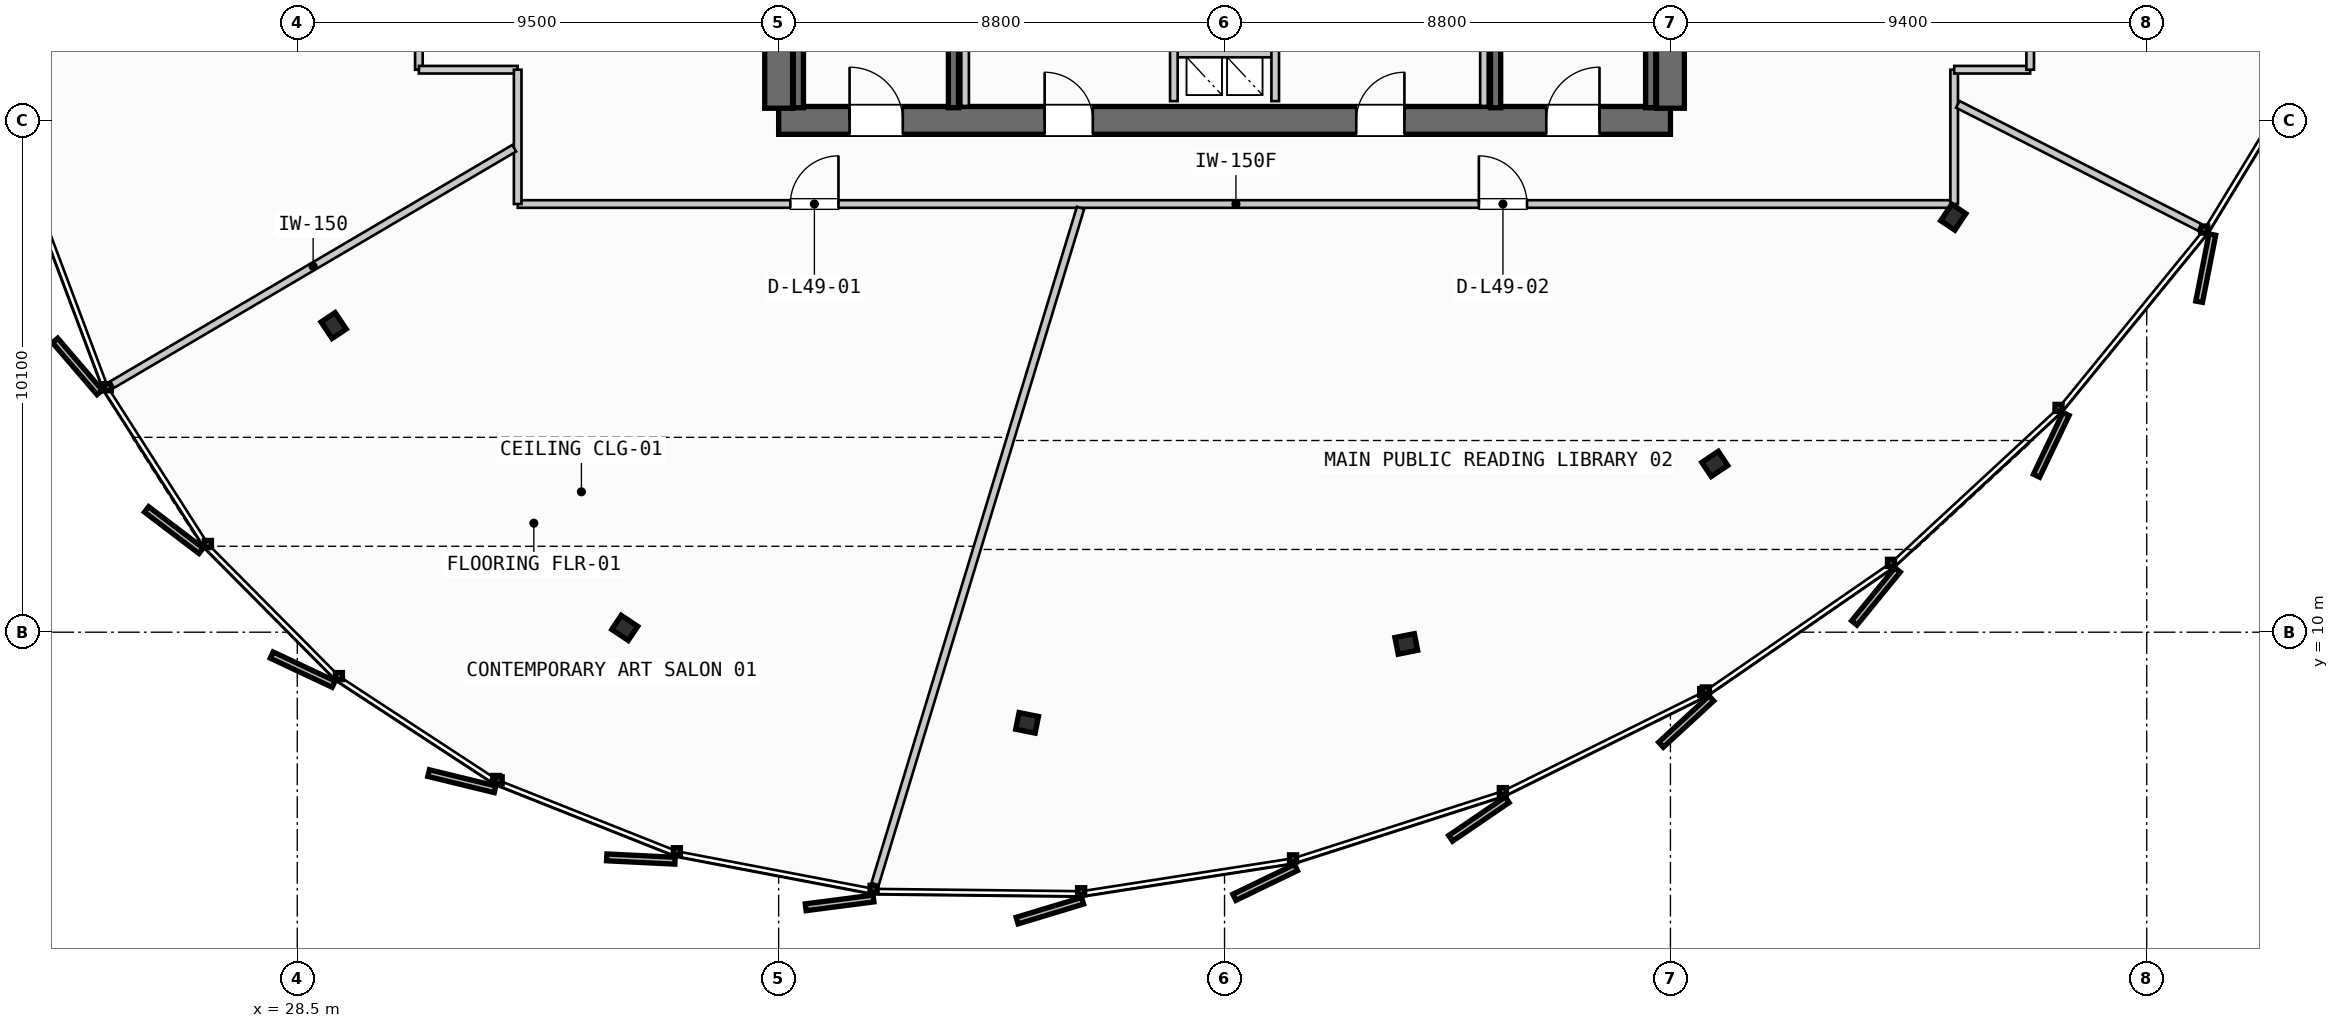
"""IFC4 building model, lengths in metres.
Left out: names, types, materials, properties, quantities, classifications, styles, units other than length and angle.
Written with IfcOpenShell. Run it as: python <this file> out.ifc"""

import sys

from ifc_helpers import new_model, si_unit, direction, frame, frame_2d, origin, origin_2d, place, context, subcontext, project, spatial, rectangle, i_section, extrude, source, transform, mapped, element, fill, save


model = new_model("IFC4")
c1 = context("Model", 3, precision=1e-05, world=origin(), true_north=direction((0.0, 1.0)))
c2 = subcontext(c1, "Body", "Model", "MODEL_VIEW")
j1 = project(units=[si_unit("LENGTHUNIT", "METRE"), si_unit("PLANEANGLEUNIT", "RADIAN")], contexts=[c1])
p1 = place(None, origin())
s1 = spatial("IfcSite", under=j1, at=p1, CompositionType="ELEMENT")
p2 = place(p1, origin())
s2 = spatial("IfcBuilding", under=s1, at=p2, CompositionType="ELEMENT")
p3 = place(p2, frame((0.0, 0.0, 190.4)))
s3 = spatial("IfcBuildingStorey", under=s2, at=p3, CompositionType="ELEMENT", Elevation=190.4)
p4 = place(p3, frame((38.0, 20.1, 0.0), z_axis=(0.0, 0.0, 1.0), x_axis=(1.0, 0.0, 0.0)))
e1 = element("IfcWall", 1, at=p4, inside=s3, PredefinedType="SHEAR", context=c2, shape_type="SweptSolid", body=[
    extrude(rectangle(XDim=17.6, YDim=0.55, at=frame_2d((8.8, 0.0))), origin(), (0.0, 0.0, 1.0), 3.26),
])
p5 = place(p4, frame((1.4, 0.0, 0.0)))
e2 = element("IfcOpeningElement", 2, at=p5, cuts=e1, PredefinedType="OPENING", context=c2, shape_type="SweptSolid", body=[
    extrude(rectangle(XDim=1.05, YDim=2.15, at=frame_2d((0.525, 1.075))), frame((0.0, 0.285, 0.0), z_axis=(0.0, -1.0, 0.0), x_axis=(1.0, 0.0, 0.0)), (0.0, 0.0, 1.0), 0.57),
])
p6 = place(p4, frame((15.15, 0.0, 0.0)))
e3 = element("IfcOpeningElement", 3, at=p6, cuts=e1, PredefinedType="OPENING", context=c2, shape_type="SweptSolid", body=[
    extrude(rectangle(XDim=1.05, YDim=2.15, at=frame_2d((0.525, 1.075))), frame((0.0, 0.285, 0.0), z_axis=(0.0, -1.0, 0.0), x_axis=(1.0, 0.0, 0.0)), (0.0, 0.0, 1.0), 0.57),
])
p7 = place(p4, frame((5.25, 0.0, 0.0)))
e4 = element("IfcOpeningElement", 4, at=p7, cuts=e1, PredefinedType="OPENING", context=c2, shape_type="SweptSolid", body=[
    extrude(rectangle(XDim=0.95, YDim=2.15, at=frame_2d((0.475, 1.075))), frame((0.0, 0.285, 0.0), z_axis=(0.0, -1.0, 0.0), x_axis=(1.0, 0.0, 0.0)), (0.0, 0.0, 1.0), 0.57),
])
p8 = place(p4, frame((11.4, 0.0, 0.0)))
e5 = element("IfcOpeningElement", 5, at=p8, cuts=e1, PredefinedType="OPENING", context=c2, shape_type="SweptSolid", body=[
    extrude(rectangle(XDim=0.95, YDim=2.15, at=frame_2d((0.475, 1.075))), frame((0.0, 0.285, 0.0), z_axis=(0.0, -1.0, 0.0), x_axis=(1.0, 0.0, 0.0)), (0.0, 0.0, 1.0), 0.57),
])
p9 = place(p3, frame((38.0, 35.26, 0.0), z_axis=(0.0, 0.0, 1.0), x_axis=(0.0, -1.0, 0.0)))
e6 = element("IfcWall", 6, at=p9, inside=s3, PredefinedType="SHEAR", context=c2, shape_type="SweptSolid", body=[
    extrude(rectangle(XDim=14.92, YDim=0.55, at=frame_2d((7.46, 0.0))), origin(), (0.0, 0.0, 1.0), 3.26),
])
p10 = place(p9, frame((5.21, 0.0, 0.0)))
e7 = element("IfcOpeningElement", 7, at=p10, cuts=e6, PredefinedType="OPENING", context=c2, shape_type="SweptSolid", body=[
    extrude(rectangle(XDim=1.1, YDim=2.2, at=frame_2d((0.55, 1.1))), frame((0.0, 0.285, 0.0), z_axis=(0.0, -1.0, 0.0), x_axis=(1.0, 0.0, 0.0)), (0.0, 0.0, 1.0), 0.57),
])
p11 = place(p3, frame((55.6, 20.34, 0.0), z_axis=(0.0, 0.0, 1.0), x_axis=(0.0, 1.0, 0.0)))
e8 = element("IfcWall", 8, at=p11, inside=s3, PredefinedType="SHEAR", context=c2, shape_type="SweptSolid", body=[
    extrude(rectangle(XDim=14.92, YDim=0.55, at=frame_2d((7.46, 0.0))), origin(), (0.0, 0.0, 1.0), 3.26),
])
p12 = place(p11, frame((12.71, 0.0, 0.0)))
e9 = element("IfcOpeningElement", 9, at=p12, cuts=e8, PredefinedType="OPENING", context=c2, shape_type="SweptSolid", body=[
    extrude(rectangle(XDim=1.05, YDim=2.15, at=frame_2d((0.525, 1.075))), frame((0.0, 0.285, 0.0), z_axis=(0.0, -1.0, 0.0), x_axis=(1.0, 0.0, 0.0)), (0.0, 0.0, 1.0), 0.57),
])
p13 = place(p11, frame((8.61, 0.0, 0.0)))
e10 = element("IfcOpeningElement", 10, at=p13, cuts=e8, PredefinedType="OPENING", context=c2, shape_type="SweptSolid", body=[
    extrude(rectangle(XDim=1.1, YDim=2.2, at=frame_2d((0.55, 1.1))), frame((0.0, 0.285, 0.0), z_axis=(0.0, -1.0, 0.0), x_axis=(1.0, 0.0, 0.0)), (0.0, 0.0, 1.0), 0.57),
])
m1 = source(origin(), c2, "Body", "SweptSolid", [
    extrude(i_section(OverallWidth=0.391, OverallDepth=0.335, WebThickness=0.023, FlangeThickness=0.034, FilletRadius=0.015, at=origin_2d()), origin(), (0.0, 0.0, 1.0), 3.26),
])
for number, where, z_axis, x_axis in (
    (11, (29.218, 16.052, 0.0), (0.0, 0.0, 1.0), (-0.831, -0.556, 0.0)),
    (12, (34.963, 10.084, 0.0), (0.0, 0.0, 1.0), (-0.556, -0.831, 0.0)),
    (13, (42.904, 8.211, 0.0), (0.0, 0.0, 1.0), (-0.195, -0.981, 0.0)),
    (14, (50.387, 9.769, 0.0), (0.0, 0.0, 1.0), (0.195, -0.981, 0.0)),
    (15, (56.475, 13.321, 0.0), (0.0, 0.0, 1.0), (0.556, -0.831, 0.0)),
    (16, (61.183, 18.19, 0.0), (0.0, 0.0, 1.0), (0.831, -0.556, 0.0)),
):
    element("IfcColumn", number, at=place(p3, frame(where, z_axis=z_axis, x_axis=x_axis)), inside=s3, PredefinedType="COLUMN", context=c2, shape_type="MappedRepresentation", body=[
        mapped(m1, transform((0.0, 0.0, 0.0), scale=1.0)),
    ])
for number, where, z_axis, x_axis in (
    (17, (41.45, 27.7, 0.0), (0.0, 0.0, 1.0), (0.0, -1.0, 0.0)),
    (18, (38.39, 20.35, 0.0), (0.0, 0.0, 1.0), (0.0, 1.0, 0.0)),
    (19, (55.21, 27.7, 0.0), (0.0, 0.0, 1.0), (0.0, -1.0, 0.0)),
    (20, (52.15, 20.35, 0.0), (0.0, 0.0, 1.0), (0.0, 1.0, 0.0)),
):
    element("IfcWall", number, at=place(p3, frame(where, z_axis=z_axis, x_axis=x_axis)), inside=s3, PredefinedType="SHEAR", context=c2, shape_type="SweptSolid", body=[
        extrude(rectangle(XDim=7.35, YDim=0.2, at=frame_2d((3.675, 0.0))), origin(), (0.0, 0.0, 1.0), 3.26),
    ])
p14 = place(p3, frame((45.8, 21.42, 0.0), z_axis=(0.0, 0.0, 1.0), x_axis=(1.0, 0.0, 0.0)))
e21 = element("IfcWall", 21, at=p14, inside=s3, PredefinedType="PARTITIONING", context=c2, shape_type="SweptSolid", body=[
    extrude(rectangle(XDim=2.0, YDim=0.15, at=frame_2d((1.0, 0.0))), origin(), (0.0, 0.0, 1.0), 2.735),
])
for number, where, z_axis, x_axis in (
    (22, (45.8, 20.48, 0.0), (0.0, 0.0, 1.0), (0.0, 1.0, 0.0)),
    (23, (47.8, 20.48, 0.0), (0.0, 0.0, 1.0), (0.0, 1.0, 0.0)),
):
    element("IfcWall", number, at=place(p3, frame(where, z_axis=z_axis, x_axis=x_axis)), inside=s3, PredefinedType="PARTITIONING", context=c2, shape_type="SweptSolid", body=[
        extrude(rectangle(XDim=2.24, YDim=0.15, at=frame_2d((1.12, 0.0))), origin(), (0.0, 0.0, 1.0), 2.735),
    ])
for number, where, z_axis, x_axis in (
    (24, (41.68, 20.385, 0.0), (0.0, 0.0, 1.0), (0.0, 1.0, 0.0)),
    (25, (51.92, 20.385, 0.0), (0.0, 0.0, 1.0), (0.0, 1.0, 0.0)),
):
    element("IfcWall", number, at=place(p3, frame(where, z_axis=z_axis, x_axis=x_axis)), inside=s3, PredefinedType="PARTITIONING", context=c2, shape_type="SweptSolid", body=[
        extrude(rectangle(XDim=2.345, YDim=0.15, at=frame_2d((1.172, 0.0))), origin(), (0.0, 0.0, 1.0), 2.735),
    ])
p15 = place(p3, frame((32.85, 18.45, 0.0), z_axis=(0.0, 0.0, 1.0), x_axis=(1.0, 0.0, 0.0)))
e26 = element("IfcWall", 26, at=p15, inside=s3, PredefinedType="PARTITIONING", context=c2, shape_type="SweptSolid", body=[
    extrude(rectangle(XDim=28.35, YDim=0.15, at=frame_2d((14.175, 0.0))), origin(), (0.0, 0.0, 1.0), 2.735),
])
p16 = place(p15, frame((5.381, 0.0, 0.0)))
e27 = element("IfcOpeningElement", 27, at=p16, cuts=e26, PredefinedType="OPENING", context=c2, shape_type="SweptSolid", body=[
    extrude(rectangle(XDim=0.95, YDim=2.15, at=frame_2d((0.475, 1.075))), frame((0.0, 0.085, 0.0), z_axis=(0.0, -1.0, 0.0), x_axis=(1.0, 0.0, 0.0)), (0.0, 0.0, 1.0), 0.17),
])
p17 = place(p15, frame((18.969, 0.0, 0.0)))
e28 = element("IfcOpeningElement", 28, at=p17, cuts=e26, PredefinedType="OPENING", context=c2, shape_type="SweptSolid", body=[
    extrude(rectangle(XDim=0.95, YDim=2.15, at=frame_2d((0.475, 1.075))), frame((0.0, 0.085, 0.0), z_axis=(0.0, -1.0, 0.0), x_axis=(1.0, 0.0, 0.0)), (0.0, 0.0, 1.0), 0.17),
])
p18 = place(p3, frame((61.2, 18.45, 0.0), z_axis=(0.0, 0.0, 1.0), x_axis=(0.0, 1.0, 0.0)))
e29 = element("IfcWall", 29, at=p18, inside=s3, PredefinedType="PARTITIONING", context=c2, shape_type="SweptSolid", body=[
    extrude(rectangle(XDim=2.65, YDim=0.15, at=frame_2d((1.325, 0.0))), origin(), (0.0, 0.0, 1.0), 2.735),
])
p19 = place(p3, frame((61.2, 21.1, 0.0), z_axis=(0.0, 0.0, 1.0), x_axis=(1.0, 0.0, 0.0)))
e30 = element("IfcWall", 30, at=p19, inside=s3, PredefinedType="PARTITIONING", context=c2, shape_type="SweptSolid", body=[
    extrude(rectangle(XDim=1.5, YDim=0.15, at=frame_2d((0.75, 0.0))), origin(), (0.0, 0.0, 1.0), 2.735),
])
for number, where, z_axis, x_axis in (
    (31, (62.7, 21.1, 0.0), (0.0, 0.0, 1.0), (0.0, 1.0, 0.0)),
    (32, (30.9, 22.8, 0.0), (0.0, 0.0, 1.0), (0.0, -1.0, 0.0)),
):
    element("IfcWall", number, at=place(p3, frame(where, z_axis=z_axis, x_axis=x_axis)), inside=s3, PredefinedType="PARTITIONING", context=c2, shape_type="SweptSolid", body=[
        extrude(rectangle(XDim=1.7, YDim=0.15, at=frame_2d((0.85, 0.0))), origin(), (0.0, 0.0, 1.0), 2.735),
    ])
p20 = place(p3, frame((30.9, 21.1, 0.0), z_axis=(0.0, 0.0, 1.0), x_axis=(1.0, 0.0, 0.0)))
e33 = element("IfcWall", 33, at=p20, inside=s3, PredefinedType="PARTITIONING", context=c2, shape_type="SweptSolid", body=[
    extrude(rectangle(XDim=1.95, YDim=0.15, at=frame_2d((0.975, 0.0))), origin(), (0.0, 0.0, 1.0), 2.735),
])
p21 = place(p3, frame((32.85, 21.1, 0.0), z_axis=(0.0, 0.0, 1.0), x_axis=(0.0, -1.0, 0.0)))
e34 = element("IfcWall", 34, at=p21, inside=s3, PredefinedType="PARTITIONING", context=c2, shape_type="SweptSolid", body=[
    extrude(rectangle(XDim=2.65, YDim=0.15, at=frame_2d((1.325, 0.0))), origin(), (0.0, 0.0, 1.0), 2.735),
])
p22 = place(p3, frame((32.781, 19.551, 0.0), z_axis=(0.0, 0.0, 1.0), x_axis=(-0.862066458286, -0.506795246129, 0.0)))
e35 = element("IfcWall", 35, at=p22, inside=s3, PredefinedType="PARTITIONING", context=c2, shape_type="SweptSolid", body=[
    extrude(rectangle(XDim=9.205, YDim=0.15, at=frame_2d((4.603, 0.0))), origin(), (0.0, 0.0, 1.0), 2.735),
])
p23 = place(p3, frame((43.958, 18.374, 0.0), z_axis=(0.0, 0.0, 1.0), x_axis=(-0.290720609317, -0.956807988741, 0.0)))
e36 = element("IfcWall", 36, at=p23, inside=s3, PredefinedType="PARTITIONING", context=c2, shape_type="SweptSolid", body=[
    extrude(rectangle(XDim=13.945, YDim=0.15, at=frame_2d((6.973, 0.0))), origin(), (0.0, 0.0, 1.0), 2.735),
])
p24 = place(p3, frame((61.271, 20.417, 0.0), z_axis=(0.0, 0.0, 1.0), x_axis=(0.891443209294, -0.453132436054, 0.0)))
e37 = element("IfcWall", 37, at=p24, inside=s3, PredefinedType="PARTITIONING", context=c2, shape_type="SweptSolid", body=[
    extrude(rectangle(XDim=5.353, YDim=0.15, at=frame_2d((2.677, 0.0))), origin(), (0.0, 0.0, 1.0), 2.735),
])
m2 = source(origin(), c2, "Body", "SweptSolid", [
    extrude(rectangle(XDim=1.05, YDim=2.15, at=frame_2d((0.525, 1.075))), frame((0.0, 0.025, 0.0), z_axis=(0.0, -1.0, 0.0), x_axis=(1.0, 0.0, 0.0)), (0.0, 0.0, 1.0), 0.05),
])
p25 = place(p5, origin())
e38 = element("IfcDoor", 38, at=p25, inside=s3, OperationType="SINGLE_SWING_LEFT", PredefinedType="DOOR", context=c2, shape_type="MappedRepresentation", body=[
    mapped(m2, transform((0.0, 0.0, 0.0), scale=1.0)),
])
fill(e2, e38)
p26 = place(p6, origin())
e39 = element("IfcDoor", 39, at=p26, inside=s3, OperationType="SINGLE_SWING_RIGHT", PredefinedType="DOOR", context=c2, shape_type="MappedRepresentation", body=[
    mapped(m2, transform((0.0, 0.0, 0.0), scale=1.0)),
])
fill(e3, e39)
m3 = source(origin(), c2, "Body", "SweptSolid", [
    extrude(rectangle(XDim=0.95, YDim=2.15, at=frame_2d((0.475, 1.075))), frame((0.0, 0.025, 0.0), z_axis=(0.0, -1.0, 0.0), x_axis=(1.0, 0.0, 0.0)), (0.0, 0.0, 1.0), 0.05),
])
p27 = place(p7, origin())
e40 = element("IfcDoor", 40, at=p27, inside=s3, OperationType="SINGLE_SWING_LEFT", PredefinedType="DOOR", context=c2, shape_type="MappedRepresentation", body=[
    mapped(m3, transform((0.0, 0.0, 0.0), scale=1.0)),
])
fill(e4, e40)
p28 = place(p8, origin())
e41 = element("IfcDoor", 41, at=p28, inside=s3, OperationType="SINGLE_SWING_RIGHT", PredefinedType="DOOR", context=c2, shape_type="MappedRepresentation", body=[
    mapped(m3, transform((0.0, 0.0, 0.0), scale=1.0)),
])
fill(e5, e41)
p29 = place(p16, origin())
e42 = element("IfcDoor", 42, at=p29, inside=s3, OperationType="SINGLE_SWING_RIGHT", PredefinedType="DOOR", context=c2, shape_type="MappedRepresentation", body=[
    mapped(m3, transform((0.0, 0.0, 0.0), scale=1.0)),
])
fill(e27, e42)
p30 = place(p17, origin())
e43 = element("IfcDoor", 43, at=p30, inside=s3, OperationType="SINGLE_SWING_LEFT", PredefinedType="DOOR", context=c2, shape_type="MappedRepresentation", body=[
    mapped(m3, transform((0.0, 0.0, 0.0), scale=1.0)),
])
fill(e28, e43)
save(model, sys.argv[1])
